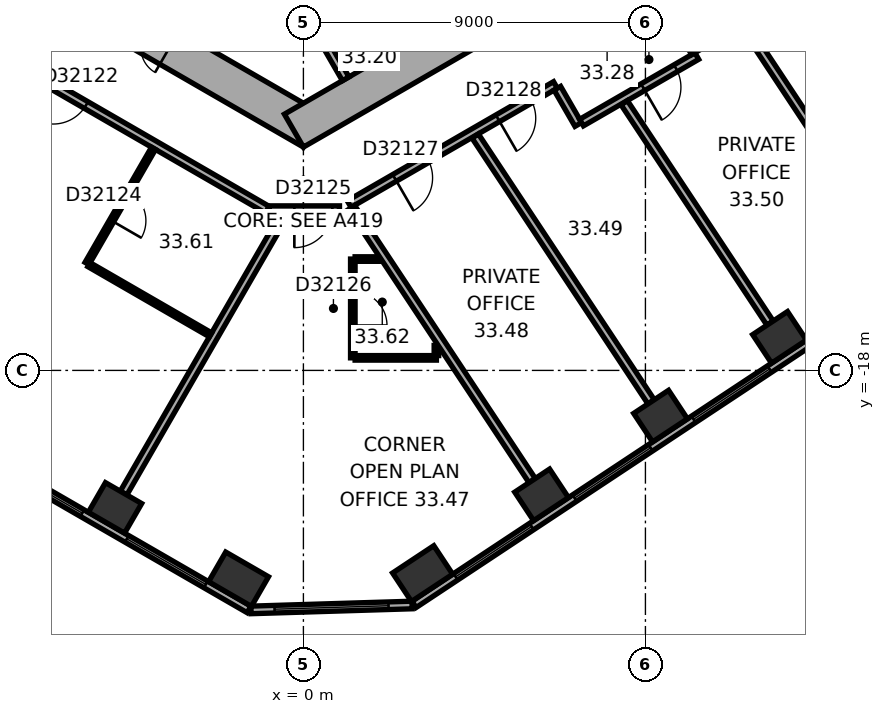
"""IFC4 building model, lengths in metres.
Left out: names, types, materials, properties, quantities, classifications, styles, units other than length and angle.
Written with IfcOpenShell. Run it as: python <this file> out.ifc"""

import sys

from ifc_helpers import new_model, si_unit, direction, frame, frame_2d, origin, origin_2d, place, context, subcontext, project, spatial, rectangle, extrude, element, fill, save


model = new_model("IFC4")
c1 = context("Model", 3, precision=1e-05, world=origin(), true_north=direction((0.0, 1.0)))
c2 = subcontext(c1, "Body", "Model", "MODEL_VIEW")
j1 = project(units=[si_unit("LENGTHUNIT", "METRE"), si_unit("PLANEANGLEUNIT", "RADIAN")], contexts=[c1])
p1 = place(None, origin())
s1 = spatial("IfcSite", under=j1, at=p1, CompositionType="ELEMENT")
p2 = place(p1, origin())
s2 = spatial("IfcBuilding", under=s1, at=p2, CompositionType="ELEMENT")
p3 = place(p2, frame((0.0, 0.0, 135.5)))
s3 = spatial("IfcBuildingStorey", under=s2, at=p3, CompositionType="ELEMENT", Elevation=135.5)
p4 = place(p3, frame((-4.958, -21.617, 0.0), z_axis=(0.0, 0.0, 1.0), x_axis=(0.866025403784, -0.5, 0.0)))
e1 = element("IfcColumn", 1, at=p4, inside=s3, PredefinedType="COLUMN", context=c2, shape_type="SweptSolid", body=[
    extrude(rectangle(XDim=1.1, YDim=0.9, at=origin_2d()), origin(), (0.0, 0.0, 1.0), 3.7),
])
for number, where, z_axis, x_axis in (
    (2, (-1.706, -23.494, 0.0), (0.0, 0.0, 1.0), (0.866, -0.5, 0.0)),
    (3, (3.137, -23.346, 0.0), (0.0, 0.0, 1.0), (0.834, 0.552, 0.0)),
):
    element("IfcColumn", number, at=place(p3, frame(where, z_axis=z_axis, x_axis=x_axis)), inside=s3, PredefinedType="COLUMN", context=c2, shape_type="SweptSolid", body=[
        extrude(rectangle(XDim=1.3, YDim=0.9, at=origin_2d()), origin(), (0.0, 0.0, 1.0), 3.7),
    ])
for number, where, z_axis, x_axis in (
    (4, (6.268, -21.274, 0.0), (0.0, 0.0, 1.0), (0.834, 0.552, 0.0)),
    (5, (9.398, -19.202, 0.0), (0.0, 0.0, 1.0), (0.834, 0.552, 0.0)),
    (6, (12.529, -17.13, 0.0), (0.0, 0.0, 1.0), (0.834, 0.552, 0.0)),
):
    element("IfcColumn", number, at=place(p3, frame(where, z_axis=z_axis, x_axis=x_axis)), inside=s3, PredefinedType="COLUMN", context=c2, shape_type="SweptSolid", body=[
        extrude(rectangle(XDim=1.1, YDim=0.9, at=origin_2d()), origin(), (0.0, 0.0, 1.0), 3.7),
    ])
p5 = place(p3, frame((-10.25, -5.629, 0.0), z_axis=(0.0, 0.0, 1.0), x_axis=(0.866022616891, -0.50000482701, 0.0)))
e7 = element("IfcWall", 7, at=p5, inside=s3, PredefinedType="SHEAR", context=c2, shape_type="SweptSolid", body=[
    extrude(rectangle(XDim=12.125, YDim=1.0, at=frame_2d((6.062, 0.0))), origin(), (0.0, 0.0, 1.0), 3.7),
])
p6 = place(p5, frame((6.262, 0.0, 0.0)))
e8 = element("IfcOpeningElement", 8, at=p6, cuts=e7, PredefinedType="OPENING", context=c2, shape_type="SweptSolid", body=[
    extrude(rectangle(XDim=1.5, YDim=2.1, at=frame_2d((0.75, 1.05))), frame((0.0, 0.51, 0.0), z_axis=(0.0, -1.0, 0.0), x_axis=(1.0, 0.0, 0.0)), (0.0, 0.0, 1.0), 1.02),
])
p7 = place(p3, frame((-0.25, -11.691, 0.0), z_axis=(0.0, 0.0, 1.0), x_axis=(0.866022616891, 0.50000482701, 0.0)))
e9 = element("IfcWall", 9, at=p7, inside=s3, PredefinedType="SHEAR", context=c2, shape_type="SweptSolid", body=[
    extrude(rectangle(XDim=12.125, YDim=1.0, at=frame_2d((6.062, 0.0))), origin(), (0.0, 0.0, 1.0), 3.7),
])
p8 = place(p7, frame((7.812, 0.0, 0.0)))
e10 = element("IfcOpeningElement", 10, at=p8, cuts=e9, PredefinedType="OPENING", context=c2, shape_type="SweptSolid", body=[
    extrude(rectangle(XDim=1.1, YDim=2.1, at=frame_2d((0.55, 1.05))), frame((0.0, 0.51, 0.0), z_axis=(0.0, -1.0, 0.0), x_axis=(1.0, 0.0, 0.0)), (0.0, 0.0, 1.0), 1.02),
])
p9 = place(p3, frame((-18.789, -14.267, 0.0), z_axis=(0.0, 0.0, 1.0), x_axis=(0.866023315909, -0.500003616288, 0.0)))
e11 = element("IfcWall", 11, at=p9, inside=s3, PredefinedType="STANDARD", context=c2, shape_type="SweptSolid", body=[
    extrude(rectangle(XDim=20.044, YDim=0.2, at=frame_2d((10.022, 0.0))), origin(), (0.0, 0.0, 1.0), 3.7),
])
p10 = place(p9, frame((1.314, 0.0, 0.9)))
e12 = element("IfcOpeningElement", 12, at=p10, cuts=e11, PredefinedType="OPENING", context=c2, shape_type="SweptSolid", body=[
    extrude(rectangle(XDim=2.4, YDim=2.0, at=frame_2d((1.2, 1.0))), frame((0.0, 0.11, 0.0), z_axis=(0.0, -1.0, 0.0), x_axis=(1.0, 0.0, 0.0)), (0.0, 0.0, 1.0), 0.22),
])
p11 = place(p9, frame((5.069, 0.0, 0.9)))
e13 = element("IfcOpeningElement", 13, at=p11, cuts=e11, PredefinedType="OPENING", context=c2, shape_type="SweptSolid", body=[
    extrude(rectangle(XDim=2.4, YDim=2.0, at=frame_2d((1.2, 1.0))), frame((0.0, 0.11, 0.0), z_axis=(0.0, -1.0, 0.0), x_axis=(1.0, 0.0, 0.0)), (0.0, 0.0, 1.0), 0.22),
])
p12 = place(p9, frame((8.823, 0.0, 0.9)))
e14 = element("IfcOpeningElement", 14, at=p12, cuts=e11, PredefinedType="OPENING", context=c2, shape_type="SweptSolid", body=[
    extrude(rectangle(XDim=2.4, YDim=2.0, at=frame_2d((1.2, 1.0))), frame((0.0, 0.11, 0.0), z_axis=(0.0, -1.0, 0.0), x_axis=(1.0, 0.0, 0.0)), (0.0, 0.0, 1.0), 0.22),
])
p13 = place(p9, frame((12.577, 0.0, 0.9)))
e15 = element("IfcOpeningElement", 15, at=p13, cuts=e11, PredefinedType="OPENING", context=c2, shape_type="SweptSolid", body=[
    extrude(rectangle(XDim=2.4, YDim=2.0, at=frame_2d((1.2, 1.0))), frame((0.0, 0.11, 0.0), z_axis=(0.0, -1.0, 0.0), x_axis=(1.0, 0.0, 0.0)), (0.0, 0.0, 1.0), 0.22),
])
p14 = place(p9, frame((16.331, 0.0, 0.9)))
e16 = element("IfcOpeningElement", 16, at=p14, cuts=e11, PredefinedType="OPENING", context=c2, shape_type="SweptSolid", body=[
    extrude(rectangle(XDim=2.4, YDim=2.0, at=frame_2d((1.2, 1.0))), frame((0.0, 0.11, 0.0), z_axis=(0.0, -1.0, 0.0), x_axis=(1.0, 0.0, 0.0)), (0.0, 0.0, 1.0), 0.22),
])
p15 = place(p3, frame((-1.378, -24.302, 0.0), z_axis=(0.0, 0.0, 1.0), x_axis=(0.999533857267, 0.030529791629, 0.0)))
e17 = element("IfcWall", 17, at=p15, inside=s3, PredefinedType="STANDARD", context=c2, shape_type="SweptSolid", body=[
    extrude(rectangle(XDim=4.238, YDim=0.2, at=frame_2d((2.119, 0.0))), origin(), (0.0, 0.0, 1.0), 3.7),
])
p16 = place(p15, frame((0.619, 0.0, 0.9)))
e18 = element("IfcOpeningElement", 18, at=p16, cuts=e17, PredefinedType="OPENING", context=c2, shape_type="SweptSolid", body=[
    extrude(rectangle(XDim=3.0, YDim=2.0, at=frame_2d((1.5, 1.0))), frame((0.0, 0.11, 0.0), z_axis=(0.0, -1.0, 0.0), x_axis=(1.0, 0.0, 0.0)), (0.0, 0.0, 1.0), 0.22),
])
p17 = place(p3, frame((2.911, -24.156, 0.0), z_axis=(0.0, 0.0, 1.0), x_axis=(0.833882163564, 0.551942512668, 0.0)))
e19 = element("IfcWall", 19, at=p17, inside=s3, PredefinedType="STANDARD", context=c2, shape_type="SweptSolid", body=[
    extrude(rectangle(XDim=20.044, YDim=0.2, at=frame_2d((10.022, 0.0))), origin(), (0.0, 0.0, 1.0), 3.7),
])
p18 = place(p17, frame((1.313, 0.0, 0.9)))
e20 = element("IfcOpeningElement", 20, at=p18, cuts=e19, PredefinedType="OPENING", context=c2, shape_type="SweptSolid", body=[
    extrude(rectangle(XDim=2.4, YDim=2.0, at=frame_2d((1.2, 1.0))), frame((0.0, 0.11, 0.0), z_axis=(0.0, -1.0, 0.0), x_axis=(1.0, 0.0, 0.0)), (0.0, 0.0, 1.0), 0.22),
])
p19 = place(p17, frame((5.067, 0.0, 0.9)))
e21 = element("IfcOpeningElement", 21, at=p19, cuts=e19, PredefinedType="OPENING", context=c2, shape_type="SweptSolid", body=[
    extrude(rectangle(XDim=2.4, YDim=2.0, at=frame_2d((1.2, 1.0))), frame((0.0, 0.11, 0.0), z_axis=(0.0, -1.0, 0.0), x_axis=(1.0, 0.0, 0.0)), (0.0, 0.0, 1.0), 0.22),
])
p20 = place(p17, frame((8.821, 0.0, 0.9)))
e22 = element("IfcOpeningElement", 22, at=p20, cuts=e19, PredefinedType="OPENING", context=c2, shape_type="SweptSolid", body=[
    extrude(rectangle(XDim=2.4, YDim=2.0, at=frame_2d((1.2, 1.0))), frame((0.0, 0.11, 0.0), z_axis=(0.0, -1.0, 0.0), x_axis=(1.0, 0.0, 0.0)), (0.0, 0.0, 1.0), 0.22),
])
p21 = place(p17, frame((12.575, 0.0, 0.9)))
e23 = element("IfcOpeningElement", 23, at=p21, cuts=e19, PredefinedType="OPENING", context=c2, shape_type="SweptSolid", body=[
    extrude(rectangle(XDim=2.4, YDim=2.0, at=frame_2d((1.2, 1.0))), frame((0.0, 0.11, 0.0), z_axis=(0.0, -1.0, 0.0), x_axis=(1.0, 0.0, 0.0)), (0.0, 0.0, 1.0), 0.22),
])
p22 = place(p17, frame((16.329, 0.0, 0.9)))
e24 = element("IfcOpeningElement", 24, at=p22, cuts=e19, PredefinedType="OPENING", context=c2, shape_type="SweptSolid", body=[
    extrude(rectangle(XDim=2.4, YDim=2.0, at=frame_2d((1.2, 1.0))), frame((0.0, 0.11, 0.0), z_axis=(0.0, -1.0, 0.0), x_axis=(1.0, 0.0, 0.0)), (0.0, 0.0, 1.0), 0.22),
])
p23 = place(p3, frame((0.013, -8.422, 0.0), z_axis=(0.0, 0.0, 1.0), x_axis=(0.500077893725, -0.86598042715, 0.0)))
e25 = element("IfcWall", 25, at=p23, inside=s3, PredefinedType="PARTITIONING", context=c2, shape_type="SweptSolid", body=[
    extrude(rectangle(XDim=2.2, YDim=0.2, at=frame_2d((1.1, 0.0))), origin(), (0.0, 0.0, 1.0), 3.35),
])
p24 = place(p3, frame((-11.415, -7.728, 0.0), z_axis=(0.0, 0.0, 1.0), x_axis=(0.866022749921, -0.500004596598, 0.0)))
e26 = element("IfcWall", 26, at=p24, inside=s3, PredefinedType="PARTITIONING", context=c2, shape_type="SweptSolid", body=[
    extrude(rectangle(XDim=12.084, YDim=0.2, at=frame_2d((6.042, 0.0))), origin(), (0.0, 0.0, 1.0), 3.35),
])
p25 = place(p24, frame((5.58, 0.0, 0.0)))
e27 = element("IfcOpeningElement", 27, at=p25, cuts=e26, PredefinedType="OPENING", context=c2, shape_type="SweptSolid", body=[
    extrude(rectangle(XDim=1.0, YDim=2.1, at=frame_2d((0.5, 1.05))), frame((0.0, 0.11, 0.0), z_axis=(0.0, -1.0, 0.0), x_axis=(1.0, 0.0, 0.0)), (0.0, 0.0, 1.0), 0.22),
])
p26 = place(p3, frame((-5.695, -15.188, 0.0), z_axis=(0.0, 0.0, 1.0), x_axis=(0.500010275428, 0.866019471182, 0.0)))
e28 = element("IfcWall", 28, at=p26, inside=s3, PredefinedType="PARTITIONING", context=c2, shape_type="SweptSolid", body=[
    extrude(rectangle(XDim=3.5, YDim=0.12, at=frame_2d((1.75, 0.0))), origin(), (0.0, 0.0, 1.0), 3.35),
])
p27 = place(p26, frame((1.3, 0.0, 0.0)))
e29 = element("IfcOpeningElement", 29, at=p27, cuts=e28, PredefinedType="OPENING", context=c2, shape_type="SweptSolid", body=[
    extrude(rectangle(XDim=0.9, YDim=2.1, at=frame_2d((0.45, 1.05))), frame((0.0, 0.07, 0.0), z_axis=(0.0, -1.0, 0.0), x_axis=(1.0, 0.0, 0.0)), (0.0, 0.0, 1.0), 0.14),
])
p28 = place(p3, frame((-4.732, -21.228, 0.0), z_axis=(0.0, 0.0, 1.0), x_axis=(0.500000843414, 0.866024916838, 0.0)))
e30 = element("IfcWall", 30, at=p28, inside=s3, PredefinedType="PARTITIONING", context=c2, shape_type="SweptSolid", body=[
    extrude(rectangle(XDim=8.452, YDim=0.2, at=frame_2d((4.226, 0.0))), origin(), (0.0, 0.0, 1.0), 3.35),
])
p29 = place(p3, frame((-2.444, -17.064, 0.0), z_axis=(0.0, 0.0, 1.0), x_axis=(-0.86602156466, 0.500006649499, 0.0)))
e31 = element("IfcWall", 31, at=p29, inside=s3, PredefinedType="PARTITIONING", context=c2, shape_type="SweptSolid", body=[
    extrude(rectangle(XDim=3.693, YDim=0.12, at=frame_2d((1.847, 0.0))), origin(), (0.0, 0.0, 1.0), 3.35),
])
p30 = place(p3, frame((-0.91, -13.77, 0.0), z_axis=(0.0, 0.0, 1.0), x_axis=(1.0, 0.0, 0.0)))
e32 = element("IfcWall", 32, at=p30, inside=s3, PredefinedType="PARTITIONING", context=c2, shape_type="SweptSolid", body=[
    extrude(rectangle(XDim=1.86, YDim=0.2, at=frame_2d((0.93, 0.0))), origin(), (0.0, 0.0, 1.0), 3.35),
])
p31 = place(p30, frame((0.672, 0.0, 0.0)))
e33 = element("IfcOpeningElement", 33, at=p31, cuts=e32, PredefinedType="OPENING", context=c2, shape_type="SweptSolid", body=[
    extrude(rectangle(XDim=1.0, YDim=2.1, at=frame_2d((0.5, 1.05))), frame((0.0, 0.11, 0.0), z_axis=(0.0, -1.0, 0.0), x_axis=(1.0, 0.0, 0.0)), (0.0, 0.0, 1.0), 0.22),
])
p32 = place(p3, frame((1.204, -13.623, 0.0), z_axis=(0.0, 0.0, 1.0), x_axis=(0.866031867142, 0.49998880497, 0.0)))
e34 = element("IfcWall", 34, at=p32, inside=s3, PredefinedType="PARTITIONING", context=c2, shape_type="SweptSolid", body=[
    extrude(rectangle(XDim=6.268, YDim=0.2, at=frame_2d((3.134, 0.0))), origin(), (0.0, 0.0, 1.0), 3.35),
])
p33 = place(p32, frame((1.381, 0.0, 0.0)))
e35 = element("IfcOpeningElement", 35, at=p33, cuts=e34, PredefinedType="OPENING", context=c2, shape_type="SweptSolid", body=[
    extrude(rectangle(XDim=1.0, YDim=2.1, at=frame_2d((0.5, 1.05))), frame((0.0, 0.11, 0.0), z_axis=(0.0, -1.0, 0.0), x_axis=(1.0, 0.0, 0.0)), (0.0, 0.0, 1.0), 0.22),
])
p34 = place(p32, frame((4.515, 0.0, 0.0)))
e36 = element("IfcOpeningElement", 36, at=p34, cuts=e34, PredefinedType="OPENING", context=c2, shape_type="SweptSolid", body=[
    extrude(rectangle(XDim=1.0, YDim=2.1, at=frame_2d((0.5, 1.05))), frame((0.0, 0.11, 0.0), z_axis=(0.0, -1.0, 0.0), x_axis=(1.0, 0.0, 0.0)), (0.0, 0.0, 1.0), 0.22),
])
p35 = place(p3, frame((1.3, -17.67, 0.0), z_axis=(0.0, 0.0, 1.0), x_axis=(0.0, 1.0, 0.0)))
e37 = element("IfcWall", 37, at=p35, inside=s3, PredefinedType="PARTITIONING", context=c2, shape_type="SweptSolid", body=[
    extrude(rectangle(XDim=2.6, YDim=0.12, at=frame_2d((1.3, 0.0))), origin(), (0.0, 0.0, 1.0), 3.35),
])
p36 = place(p35, frame((0.85, 0.0, 0.0)))
e38 = element("IfcOpeningElement", 38, at=p36, cuts=e37, PredefinedType="OPENING", context=c2, shape_type="SweptSolid", body=[
    extrude(rectangle(XDim=0.9, YDim=2.1, at=frame_2d((0.45, 1.05))), frame((0.0, 0.07, 0.0), z_axis=(0.0, -1.0, 0.0), x_axis=(1.0, 0.0, 0.0)), (0.0, 0.0, 1.0), 0.14),
])
p37 = place(p3, frame((1.36, -15.07, 0.0), z_axis=(0.0, 0.0, 1.0), x_axis=(1.0, 0.0, 0.0)))
e39 = element("IfcWall", 39, at=p37, inside=s3, PredefinedType="PARTITIONING", context=c2, shape_type="SweptSolid", body=[
    extrude(rectangle(XDim=0.651, YDim=0.12, at=frame_2d((0.325, 0.0))), origin(), (0.0, 0.0, 1.0), 3.35),
])
p38 = place(p3, frame((3.5, -17.67, 0.0), z_axis=(0.0, 0.0, 1.0), x_axis=(-1.0, 0.0, 0.0)))
e40 = element("IfcWall", 40, at=p38, inside=s3, PredefinedType="PARTITIONING", context=c2, shape_type="SweptSolid", body=[
    extrude(rectangle(XDim=2.14, YDim=0.12, at=frame_2d((1.07, 0.0))), origin(), (0.0, 0.0, 1.0), 3.35),
])
p39 = place(p3, frame((3.5, -17.343, 0.0), z_axis=(0.0, 0.0, 1.0), x_axis=(0.0, -1.0, 0.0)))
e41 = element("IfcWall", 41, at=p39, inside=s3, PredefinedType="PARTITIONING", context=c2, shape_type="SweptSolid", body=[
    extrude(rectangle(XDim=0.267, YDim=0.12, at=frame_2d((0.134, 0.0))), origin(), (0.0, 0.0, 1.0), 3.35),
])
p40 = place(p3, frame((6.02, -20.899, 0.0), z_axis=(0.0, 0.0, 1.0), x_axis=(-0.551943990108, 0.833881185651, 0.0)))
e42 = element("IfcWall", 42, at=p40, inside=s3, PredefinedType="PARTITIONING", context=c2, shape_type="SweptSolid", body=[
    extrude(rectangle(XDim=8.615, YDim=0.2, at=frame_2d((4.308, 0.0))), origin(), (0.0, 0.0, 1.0), 3.35),
])
p41 = place(p3, frame((6.682, -10.576, 0.0), z_axis=(0.0, 0.0, 1.0), x_axis=(0.499978356969, -0.866037899034, 0.0)))
e43 = element("IfcWall", 43, at=p41, inside=s3, PredefinedType="PARTITIONING", context=c2, shape_type="SweptSolid", body=[
    extrude(rectangle(XDim=1.101, YDim=0.2, at=frame_2d((0.551, 0.0))), origin(), (0.0, 0.0, 1.0), 3.35),
])
p42 = place(p3, frame((7.319, -11.479, 0.0), z_axis=(0.0, 0.0, 1.0), x_axis=(0.866038154057, 0.49997791523, 0.0)))
e44 = element("IfcWall", 44, at=p42, inside=s3, PredefinedType="PARTITIONING", context=c2, shape_type="SweptSolid", body=[
    extrude(rectangle(XDim=3.502, YDim=0.2, at=frame_2d((1.751, 0.0))), origin(), (0.0, 0.0, 1.0), 3.35),
])
p43 = place(p42, frame((1.865, 0.0, 0.0)))
e45 = element("IfcOpeningElement", 45, at=p43, cuts=e44, PredefinedType="OPENING", context=c2, shape_type="SweptSolid", body=[
    extrude(rectangle(XDim=1.0, YDim=2.1, at=frame_2d((0.5, 1.05))), frame((0.0, 0.11, 0.0), z_axis=(0.0, -1.0, 0.0), x_axis=(1.0, 0.0, 0.0)), (0.0, 0.0, 1.0), 0.22),
])
p44 = place(p3, frame((9.15, -18.827, 0.0), z_axis=(0.0, 0.0, 1.0), x_axis=(-0.551942527453, 0.833882153777, 0.0)))
e46 = element("IfcWall", 46, at=p44, inside=s3, PredefinedType="PARTITIONING", context=c2, shape_type="SweptSolid", body=[
    extrude(rectangle(XDim=8.386, YDim=0.2, at=frame_2d((4.193, 0.0))), origin(), (0.0, 0.0, 1.0), 2.55),
])
p45 = place(p3, frame((10.302, -9.642, 0.0), z_axis=(0.0, 0.0, 1.0), x_axis=(-0.500074377092, 0.865982457891, 0.0)))
e47 = element("IfcWall", 47, at=p45, inside=s3, PredefinedType="PARTITIONING", context=c2, shape_type="SweptSolid", body=[
    extrude(rectangle(XDim=1.001, YDim=0.2, at=frame_2d((0.5, 0.0))), origin(), (0.0, 0.0, 1.0), 3.35),
])
p46 = place(p3, frame((12.281, -16.755, 0.0), z_axis=(0.0, 0.0, 1.0), x_axis=(-0.551925794663, 0.833893228888, 0.0)))
e48 = element("IfcWall", 48, at=p46, inside=s3, PredefinedType="PARTITIONING", context=c2, shape_type="SweptSolid", body=[
    extrude(rectangle(XDim=6.953, YDim=0.2, at=frame_2d((3.476, 0.0))), origin(), (0.0, 0.0, 1.0), 3.35),
])
p47 = place(p3, frame((15.411, -14.683, 0.0), z_axis=(0.0, 0.0, 1.0), x_axis=(-0.551932106251, 0.833889051427, 0.0)))
e49 = element("IfcWall", 49, at=p47, inside=s3, PredefinedType="PARTITIONING", context=c2, shape_type="SweptSolid", body=[
    extrude(rectangle(XDim=7.926, YDim=0.2, at=frame_2d((3.963, 0.0))), origin(), (0.0, 0.0, 1.0), 2.55),
])
p48 = place(p13, origin())
e50 = element("IfcWindow", 50, at=p48, inside=s3, PartitioningType="SINGLE_PANEL", PredefinedType="WINDOW", context=c2, shape_type="SweptSolid", body=[
    extrude(rectangle(XDim=2.4, YDim=2.0, at=frame_2d((1.2, 1.0))), frame((0.0, 0.03, 0.0), z_axis=(0.0, -1.0, 0.0), x_axis=(1.0, 0.0, 0.0)), (0.0, 0.0, 1.0), 0.06),
])
fill(e15, e50)
p49 = place(p14, origin())
e51 = element("IfcWindow", 51, at=p49, inside=s3, PartitioningType="SINGLE_PANEL", PredefinedType="WINDOW", context=c2, shape_type="SweptSolid", body=[
    extrude(rectangle(XDim=2.4, YDim=2.0, at=frame_2d((1.2, 1.0))), frame((0.0, 0.03, 0.0), z_axis=(0.0, -1.0, 0.0), x_axis=(1.0, 0.0, 0.0)), (0.0, 0.0, 1.0), 0.06),
])
fill(e16, e51)
p50 = place(p16, origin())
e52 = element("IfcWindow", 52, at=p50, inside=s3, PartitioningType="SINGLE_PANEL", PredefinedType="WINDOW", context=c2, shape_type="SweptSolid", body=[
    extrude(rectangle(XDim=3.0, YDim=2.0, at=frame_2d((1.5, 1.0))), frame((0.0, 0.03, 0.0), z_axis=(0.0, -1.0, 0.0), x_axis=(1.0, 0.0, 0.0)), (0.0, 0.0, 1.0), 0.06),
])
fill(e18, e52)
p51 = place(p18, origin())
e53 = element("IfcWindow", 53, at=p51, inside=s3, PartitioningType="SINGLE_PANEL", PredefinedType="WINDOW", context=c2, shape_type="SweptSolid", body=[
    extrude(rectangle(XDim=2.4, YDim=2.0, at=frame_2d((1.2, 1.0))), frame((0.0, 0.03, 0.0), z_axis=(0.0, -1.0, 0.0), x_axis=(1.0, 0.0, 0.0)), (0.0, 0.0, 1.0), 0.06),
])
fill(e20, e53)
p52 = place(p19, origin())
e54 = element("IfcWindow", 54, at=p52, inside=s3, PartitioningType="SINGLE_PANEL", PredefinedType="WINDOW", context=c2, shape_type="SweptSolid", body=[
    extrude(rectangle(XDim=2.4, YDim=2.0, at=frame_2d((1.2, 1.0))), frame((0.0, 0.03, 0.0), z_axis=(0.0, -1.0, 0.0), x_axis=(1.0, 0.0, 0.0)), (0.0, 0.0, 1.0), 0.06),
])
fill(e21, e54)
p53 = place(p20, origin())
e55 = element("IfcWindow", 55, at=p53, inside=s3, PartitioningType="SINGLE_PANEL", PredefinedType="WINDOW", context=c2, shape_type="SweptSolid", body=[
    extrude(rectangle(XDim=2.4, YDim=2.0, at=frame_2d((1.2, 1.0))), frame((0.0, 0.03, 0.0), z_axis=(0.0, -1.0, 0.0), x_axis=(1.0, 0.0, 0.0)), (0.0, 0.0, 1.0), 0.06),
])
fill(e22, e55)
p54 = place(p25, origin())
e56 = element("IfcDoor", 56, at=p54, inside=s3, OperationType="SINGLE_SWING_LEFT", PredefinedType="DOOR", context=c2, shape_type="SweptSolid", body=[
    extrude(rectangle(XDim=1.0, YDim=2.1, at=frame_2d((0.5, 1.05))), frame((0.0, 0.025, 0.0), z_axis=(0.0, -1.0, 0.0), x_axis=(1.0, 0.0, 0.0)), (0.0, 0.0, 1.0), 0.05),
])
fill(e27, e56)
p55 = place(p27, origin())
e57 = element("IfcDoor", 57, at=p55, inside=s3, OperationType="SINGLE_SWING_LEFT", PredefinedType="DOOR", context=c2, shape_type="SweptSolid", body=[
    extrude(rectangle(XDim=0.9, YDim=2.1, at=frame_2d((0.45, 1.05))), frame((0.0, 0.025, 0.0), z_axis=(0.0, -1.0, 0.0), x_axis=(1.0, 0.0, 0.0)), (0.0, 0.0, 1.0), 0.05),
])
fill(e29, e57)
p56 = place(p31, origin())
e58 = element("IfcDoor", 58, at=p56, inside=s3, OperationType="SINGLE_SWING_LEFT", PredefinedType="DOOR", context=c2, shape_type="SweptSolid", body=[
    extrude(rectangle(XDim=1.0, YDim=2.1, at=frame_2d((0.5, 1.05))), frame((0.0, 0.025, 0.0), z_axis=(0.0, -1.0, 0.0), x_axis=(1.0, 0.0, 0.0)), (0.0, 0.0, 1.0), 0.05),
])
fill(e33, e58)
p57 = place(p36, origin())
e59 = element("IfcDoor", 59, at=p57, inside=s3, OperationType="SINGLE_SWING_LEFT", PredefinedType="DOOR", context=c2, shape_type="SweptSolid", body=[
    extrude(rectangle(XDim=0.9, YDim=2.1, at=frame_2d((0.45, 1.05))), frame((0.0, 0.025, 0.0), z_axis=(0.0, -1.0, 0.0), x_axis=(1.0, 0.0, 0.0)), (0.0, 0.0, 1.0), 0.05),
])
fill(e38, e59)
p58 = place(p33, origin())
e60 = element("IfcDoor", 60, at=p58, inside=s3, OperationType="SINGLE_SWING_LEFT", PredefinedType="DOOR", context=c2, shape_type="SweptSolid", body=[
    extrude(rectangle(XDim=1.0, YDim=2.1, at=frame_2d((0.5, 1.05))), frame((0.0, 0.025, 0.0), z_axis=(0.0, -1.0, 0.0), x_axis=(1.0, 0.0, 0.0)), (0.0, 0.0, 1.0), 0.05),
])
fill(e35, e60)
p59 = place(p34, origin())
e61 = element("IfcDoor", 61, at=p59, inside=s3, OperationType="SINGLE_SWING_LEFT", PredefinedType="DOOR", context=c2, shape_type="SweptSolid", body=[
    extrude(rectangle(XDim=1.0, YDim=2.1, at=frame_2d((0.5, 1.05))), frame((0.0, 0.025, 0.0), z_axis=(0.0, -1.0, 0.0), x_axis=(1.0, 0.0, 0.0)), (0.0, 0.0, 1.0), 0.05),
])
fill(e36, e61)
p60 = place(p43, origin())
e62 = element("IfcDoor", 62, at=p60, inside=s3, OperationType="SINGLE_SWING_LEFT", PredefinedType="DOOR", context=c2, shape_type="SweptSolid", body=[
    extrude(rectangle(XDim=1.0, YDim=2.1, at=frame_2d((0.5, 1.05))), frame((0.0, 0.025, 0.0), z_axis=(0.0, -1.0, 0.0), x_axis=(1.0, 0.0, 0.0)), (0.0, 0.0, 1.0), 0.05),
])
fill(e45, e62)
save(model, sys.argv[1])
